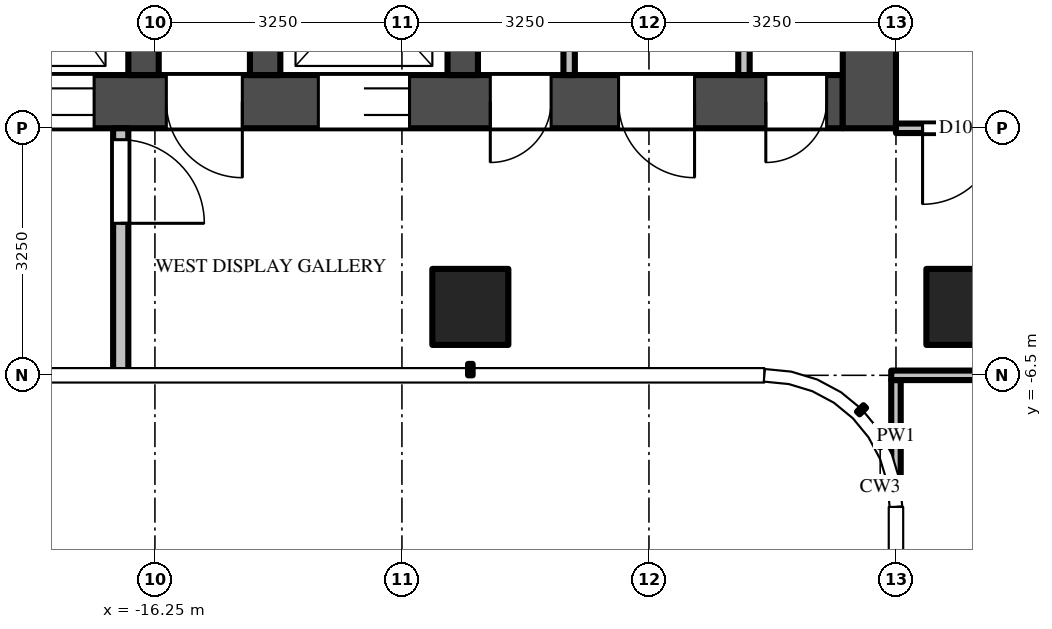
"""IFC4 building model, lengths in metres.
Left out: names, types, materials, properties, quantities, classifications, styles, units other than length and angle.
Written with IfcOpenShell. Run it as: python <this file> out.ifc"""

import sys

from ifc_helpers import new_model, si_unit, direction, frame, frame_2d, origin, origin_2d, place, context, subcontext, project, spatial, rectangle, extrude, source, transform, mapped, element, fill, save


model = new_model("IFC4")
c1 = context("Model", 3, precision=1e-05, world=origin(), true_north=direction((0.0, 1.0)))
c2 = subcontext(c1, "Body", "Model", "MODEL_VIEW")
j1 = project(units=[si_unit("LENGTHUNIT", "METRE"), si_unit("PLANEANGLEUNIT", "RADIAN")], contexts=[c1])
p1 = place(None, origin())
s1 = spatial("IfcSite", under=j1, at=p1, CompositionType="ELEMENT")
p2 = place(p1, origin())
s2 = spatial("IfcBuilding", under=s1, at=p2, CompositionType="ELEMENT")
p3 = place(p2, frame((0.0, 0.0, 302.8)))
s3 = spatial("IfcBuildingStorey", under=s2, at=p3, CompositionType="ELEMENT", Elevation=302.8)
m1 = source(origin(), c2, "Body", "SweptSolid", [
    extrude(rectangle(XDim=1.0, YDim=1.0, at=origin_2d()), origin(), (0.0, 0.0, 1.0), 3.9),
])
for number, where, z_axis, x_axis in (
    (1, (-5.6, -5.6, 0.0), (0.0, 0.0, 1.0), (1.0, 0.0, 0.0)),
    (2, (-12.1, -5.6, 0.0), (0.0, 0.0, 1.0), (1.0, 0.0, 0.0)),
):
    element("IfcColumn", number, at=place(p3, frame(where, z_axis=z_axis, x_axis=x_axis)), inside=s3, PredefinedType="COLUMN", context=c2, shape_type="MappedRepresentation", body=[
        mapped(m1, transform((0.0, 0.0, 0.0))),
    ])
m2 = source(origin(), c2, "Body", "SweptSolid", [
    extrude(rectangle(XDim=14.85, YDim=0.7, at=frame_2d((7.425, 0.0))), origin(), (0.0, 0.0, 1.0), 3.7),
])
p4 = place(p3, frame((-7.2, -2.9, 0.0), z_axis=(0.0, 0.0, 1.0), x_axis=(-1.0, 0.0, 0.0)))
e3 = element("IfcWall", 3, at=p4, inside=s3, PredefinedType="SHEAR", context=c2, shape_type="MappedRepresentation", body=[
    mapped(m2, transform((0.0, 0.0, 0.0))),
])
m3 = source(origin(), c2, "Body", "SweptSolid", [
    extrude(rectangle(XDim=1.2, YDim=2.1, at=frame_2d((0.6, 1.05))), frame((0.0, 0.36, 0.0), z_axis=(0.0, -1.0, 0.0), x_axis=(1.0, 0.0, 0.0)), (0.0, 0.0, 1.0), 0.72),
])
p5 = place(p4, frame((5.7, 0.0, 0.0)))
e4 = element("IfcOpeningElement", 4, at=p5, cuts=e3, PredefinedType="OPENING", context=c2, shape_type="MappedRepresentation", body=[
    mapped(m3, transform((0.0, 0.0, 0.0))),
])
m4 = source(origin(), c2, "Body", "SweptSolid", [
    extrude(rectangle(XDim=1.3, YDim=2.1, at=frame_2d((0.65, 1.05))), frame((0.0, 0.36, 0.0), z_axis=(0.0, -1.0, 0.0), x_axis=(1.0, 0.0, 0.0)), (0.0, 0.0, 1.0), 0.72),
])
p6 = place(p4, frame((12.2, 0.0, 0.0)))
e5 = element("IfcOpeningElement", 5, at=p6, cuts=e3, PredefinedType="OPENING", context=c2, shape_type="MappedRepresentation", body=[
    mapped(m4, transform((0.0, 0.0, 0.0))),
])
p7 = place(p4, frame((9.85, 0.0, 0.0)))
e6 = element("IfcOpeningElement", 6, at=p7, cuts=e3, PredefinedType="OPENING", context=c2, shape_type="MappedRepresentation", body=[
    mapped(m3, transform((0.0, 0.0, 0.0))),
])
m5 = source(origin(), c2, "Body", "SweptSolid", [
    extrude(rectangle(XDim=1.0, YDim=2.1, at=frame_2d((0.5, 1.05))), frame((0.0, 0.36, 0.0), z_axis=(0.0, -1.0, 0.0), x_axis=(1.0, 0.0, 0.0)), (0.0, 0.0, 1.0), 0.72),
])
p8 = place(p4, frame((7.9, 0.0, 0.0)))
e7 = element("IfcOpeningElement", 7, at=p8, cuts=e3, PredefinedType="OPENING", context=c2, shape_type="MappedRepresentation", body=[
    mapped(m5, transform((0.0, 0.0, 0.0))),
])
m6 = source(origin(), c2, "Body", "SweptSolid", [
    extrude(rectangle(XDim=0.8, YDim=2.1, at=frame_2d((0.4, 1.05))), frame((0.0, 0.36, 0.0), z_axis=(0.0, -1.0, 0.0), x_axis=(1.0, 0.0, 0.0)), (0.0, 0.0, 1.0), 0.72),
])
p9 = place(p4, frame((0.212, 0.0, 0.0)))
e8 = element("IfcOpeningElement", 8, at=p9, cuts=e3, PredefinedType="OPENING", context=c2, shape_type="MappedRepresentation", body=[
    mapped(m6, transform((0.0, 0.0, 0.0))),
])
p10 = place(p4, frame((1.95, 0.0, 0.0)))
e9 = element("IfcOpeningElement", 9, at=p10, cuts=e3, PredefinedType="OPENING", context=c2, shape_type="MappedRepresentation", body=[
    mapped(m5, transform((0.0, 0.0, 0.0))),
])
p11 = place(p4, frame((3.837, 0.0, 0.0)))
e10 = element("IfcOpeningElement", 10, at=p11, cuts=e3, PredefinedType="OPENING", context=c2, shape_type="MappedRepresentation", body=[
    mapped(m6, transform((0.0, 0.0, 0.0))),
])
m7 = source(origin(), c2, "Body", "SweptSolid", [
    extrude(rectangle(XDim=9.05, YDim=0.7, at=frame_2d((4.525, 0.0))), origin(), (0.0, 0.0, 1.0), 3.7),
])
p12 = place(p3, frame((-6.85, 5.8, 0.0), z_axis=(0.0, 0.0, 1.0), x_axis=(0.0, -1.0, 0.0)))
e11 = element("IfcWall", 11, at=p12, inside=s3, PredefinedType="SHEAR", context=c2, shape_type="MappedRepresentation", body=[
    mapped(m7, transform((0.0, 0.0, 0.0))),
])
m8 = source(origin(), c2, "Body", "SweptSolid", [
    extrude(rectangle(XDim=1.8, YDim=2.1, at=frame_2d((0.9, 1.05))), frame((0.0, 0.36, 0.0), z_axis=(0.0, -1.0, 0.0), x_axis=(1.0, 0.0, 0.0)), (0.0, 0.0, 1.0), 0.72),
])
p13 = place(p12, frame((3.15, 0.0, 0.0)))
e12 = element("IfcOpeningElement", 12, at=p13, cuts=e11, PredefinedType="OPENING", context=c2, shape_type="MappedRepresentation", body=[
    mapped(m8, transform((0.0, 0.0, 0.0))),
])
m9 = source(origin(), c2, "Body", "SweptSolid", [
    extrude(rectangle(XDim=2.45, YDim=0.4, at=frame_2d((1.225, 0.0))), origin(), (0.0, 0.0, 1.0), 3.7),
])
for number, where, z_axis, x_axis in (
    (13, (-12.2, -0.1, 0.0), (0.0, 0.0, 1.0), (0.0, -1.0, 0.0)),
    (14, (-14.8, -0.1, 0.0), (0.0, 0.0, 1.0), (0.0, -1.0, 0.0)),
    (15, (-16.4, -0.1, 0.0), (0.0, 0.0, 1.0), (0.0, -1.0, 0.0)),
):
    element("IfcWall", number, at=place(p3, frame(where, z_axis=z_axis, x_axis=x_axis)), inside=s3, PredefinedType="SHEAR", context=c2, shape_type="MappedRepresentation", body=[
        mapped(m9, transform((0.0, 0.0, 0.0))),
    ])
m10 = source(origin(), c2, "Body", "SweptSolid", [
    extrude(rectangle(XDim=3.25, YDim=0.2, at=frame_2d((1.625, 0.0))), origin(), (0.0, 0.0, 1.0), 3.7),
])
p14 = place(p3, frame((-16.7, -3.25, 0.0), z_axis=(0.0, 0.0, 1.0), x_axis=(0.0, -1.0, 0.0)))
e16 = element("IfcWall", 16, at=p14, inside=s3, PredefinedType="PARTITIONING", context=c2, shape_type="MappedRepresentation", body=[
    mapped(m10, transform((0.0, 0.0, 0.0))),
])
m11 = source(origin(), c2, "Body", "SweptSolid", [
    extrude(rectangle(XDim=1.1, YDim=2.1, at=frame_2d((0.55, 1.05))), frame((0.0, 0.11, 0.0), z_axis=(0.0, -1.0, 0.0), x_axis=(1.0, 0.0, 0.0)), (0.0, 0.0, 1.0), 0.22),
])
p15 = place(p14, frame((0.15, 0.0, 0.0)))
e17 = element("IfcOpeningElement", 17, at=p15, cuts=e16, PredefinedType="OPENING", context=c2, shape_type="MappedRepresentation", body=[
    mapped(m11, transform((0.0, 0.0, 0.0))),
])
m12 = source(origin(), c2, "Body", "SweptSolid", [
    extrude(rectangle(XDim=2.45, YDim=0.15, at=frame_2d((1.225, 0.0))), origin(), (0.0, 0.0, 1.0), 3.7),
])
for number, where, z_axis, x_axis in (
    (18, (-8.5, -0.1, 0.0), (0.0, 0.0, 1.0), (0.0, -1.0, 0.0)),
    (19, (-10.8, -0.1, 0.0), (0.0, 0.0, 1.0), (0.0, -1.0, 0.0)),
):
    element("IfcWall", number, at=place(p3, frame(where, z_axis=z_axis, x_axis=x_axis)), inside=s3, PredefinedType="PARTITIONING", context=c2, shape_type="MappedRepresentation", body=[
        mapped(m12, transform((0.0, 0.0, 0.0))),
    ])
m13 = source(origin(), c2, "Body", "SweptSolid", [
    extrude(rectangle(XDim=1.469, YDim=0.125, at=frame_2d((0.734, 0.0))), origin(), (0.0, 0.0, 1.0), 3.7),
])
p16 = place(p3, frame((-6.5, -6.562, 0.0), z_axis=(0.0, 0.0, 1.0), x_axis=(0.0, -1.0, 0.0)))
e20 = element("IfcWall", 20, at=p16, inside=s3, PredefinedType="PARTITIONING", context=c2, shape_type="MappedRepresentation", body=[
    mapped(m13, transform((0.0, 0.0, 0.0))),
])
m14 = source(origin(), c2, "Body", "SweptSolid", [
    extrude(rectangle(XDim=5.425, YDim=0.125, at=frame_2d((2.712, 0.0))), origin(), (0.0, 0.0, 1.0), 2.78),
])
p17 = place(p3, frame((-1.137, -6.5, 0.0), z_axis=(0.0, 0.0, 1.0), x_axis=(-1.0, 0.0, 0.0)))
e21 = element("IfcWall", 21, at=p17, inside=s3, PredefinedType="PARTITIONING", context=c2, shape_type="MappedRepresentation", body=[
    mapped(m14, transform((0.0, 0.0, 0.0))),
])
m15 = source(origin(), c2, "Body", "SweptSolid", [
    extrude(rectangle(XDim=1.0, YDim=2.1, at=frame_2d((0.5, 1.05))), frame((0.0, 0.073, 0.0), z_axis=(0.0, -1.0, 0.0), x_axis=(1.0, 0.0, 0.0)), (0.0, 0.0, 1.0), 0.145),
])
p18 = place(p17, frame((2.913, 0.0, 0.0)))
e22 = element("IfcOpeningElement", 22, at=p18, cuts=e21, PredefinedType="OPENING", context=c2, shape_type="MappedRepresentation", body=[
    mapped(m15, transform((0.0, 0.0, 0.0))),
])
m16 = source(origin(), c2, "Body", "SweptSolid", [
    extrude(rectangle(XDim=5.363, YDim=0.125, at=frame_2d((2.681, 0.0))), origin(), (0.0, 0.0, 1.0), 2.997),
])
p19 = place(p3, frame((-1.137, -3.25, 0.0), z_axis=(0.0, 0.0, 1.0), x_axis=(-1.0, 0.0, 0.0)))
e23 = element("IfcWall", 23, at=p19, inside=s3, PredefinedType="PARTITIONING", context=c2, shape_type="MappedRepresentation", body=[
    mapped(m16, transform((0.0, 0.0, 0.0))),
])
p20 = place(p19, frame((4.012, 0.0, 0.0)))
e24 = element("IfcOpeningElement", 24, at=p20, cuts=e23, PredefinedType="OPENING", context=c2, shape_type="MappedRepresentation", body=[
    mapped(m15, transform((0.0, 0.0, 0.0))),
])
m17 = source(origin(), c2, "Body", "SweptSolid", [
    extrude(rectangle(XDim=1.2, YDim=2.1, at=frame_2d((0.6, 1.05))), frame((0.0, -0.275, 0.0), z_axis=(0.0, -1.0, 0.0), x_axis=(1.0, 0.0, 0.0)), (0.0, 0.0, 1.0), 0.05),
])
p21 = place(p5, origin())
e25 = element("IfcDoor", 25, at=p21, inside=s3, OperationType="DOUBLE_DOOR_SLIDING", PredefinedType="DOOR", context=c2, shape_type="MappedRepresentation", body=[
    mapped(m17, transform((0.0, 0.0, 0.0))),
])
fill(e4, e25)
p22 = place(p7, origin())
e26 = element("IfcDoor", 26, at=p22, inside=s3, OperationType="DOUBLE_DOOR_SLIDING", PredefinedType="DOOR", context=c2, shape_type="MappedRepresentation", body=[
    mapped(m17, transform((0.0, 0.0, 0.0))),
])
fill(e6, e26)
m18 = source(origin(), c2, "Body", "SweptSolid", [
    extrude(rectangle(XDim=1.0, YDim=2.1, at=frame_2d((0.5, 1.05))), frame((0.0, -0.275, 0.0), z_axis=(0.0, -1.0, 0.0), x_axis=(1.0, 0.0, 0.0)), (0.0, 0.0, 1.0), 0.05),
])
p23 = place(p8, origin())
e27 = element("IfcDoor", 27, at=p23, inside=s3, OperationType="SINGLE_SWING_LEFT", PredefinedType="DOOR", context=c2, shape_type="MappedRepresentation", body=[
    mapped(m18, transform((0.0, 0.0, 0.0))),
])
fill(e7, e27)
m19 = source(origin(), c2, "Body", "SweptSolid", [
    extrude(rectangle(XDim=1.1, YDim=2.1, at=frame_2d((0.55, 1.05))), frame((0.0, 0.025, 0.0), z_axis=(0.0, -1.0, 0.0), x_axis=(1.0, 0.0, 0.0)), (0.0, 0.0, 1.0), 0.05),
])
p24 = place(p15, origin())
e28 = element("IfcDoor", 28, at=p24, inside=s3, OperationType="SINGLE_SWING_RIGHT", PredefinedType="DOOR", context=c2, shape_type="MappedRepresentation", body=[
    mapped(m19, transform((0.0, 0.0, 0.0))),
])
fill(e17, e28)
m20 = source(origin(), c2, "Body", "SweptSolid", [
    extrude(rectangle(XDim=0.8, YDim=2.1, at=frame_2d((0.4, 1.05))), frame((0.0, -0.275, 0.0), z_axis=(0.0, -1.0, 0.0), x_axis=(1.0, 0.0, 0.0)), (0.0, 0.0, 1.0), 0.05),
])
p25 = place(p9, origin())
e29 = element("IfcDoor", 29, at=p25, inside=s3, OperationType="SINGLE_SWING_RIGHT", PredefinedType="DOOR", context=c2, shape_type="MappedRepresentation", body=[
    mapped(m20, transform((0.0, 0.0, 0.0))),
])
fill(e8, e29)
p26 = place(p10, origin())
e30 = element("IfcDoor", 30, at=p26, inside=s3, OperationType="SINGLE_SWING_LEFT", PredefinedType="DOOR", context=c2, shape_type="MappedRepresentation", body=[
    mapped(m18, transform((0.0, 0.0, 0.0))),
])
fill(e9, e30)
p27 = place(p11, origin())
e31 = element("IfcDoor", 31, at=p27, inside=s3, OperationType="SINGLE_SWING_RIGHT", PredefinedType="DOOR", context=c2, shape_type="MappedRepresentation", body=[
    mapped(m20, transform((0.0, 0.0, 0.0))),
])
fill(e10, e31)
m21 = source(origin(), c2, "Body", "SweptSolid", [
    extrude(rectangle(XDim=1.0, YDim=2.1, at=frame_2d((0.5, 1.05))), frame((0.0, 0.025, 0.0), z_axis=(0.0, -1.0, 0.0), x_axis=(1.0, 0.0, 0.0)), (0.0, 0.0, 1.0), 0.05),
])
p28 = place(p20, origin())
e32 = element("IfcDoor", 32, at=p28, inside=s3, OperationType="SINGLE_SWING_RIGHT", PredefinedType="DOOR", context=c2, shape_type="MappedRepresentation", body=[
    mapped(m21, transform((0.0, 0.0, 0.0))),
])
fill(e24, e32)
save(model, sys.argv[1])
